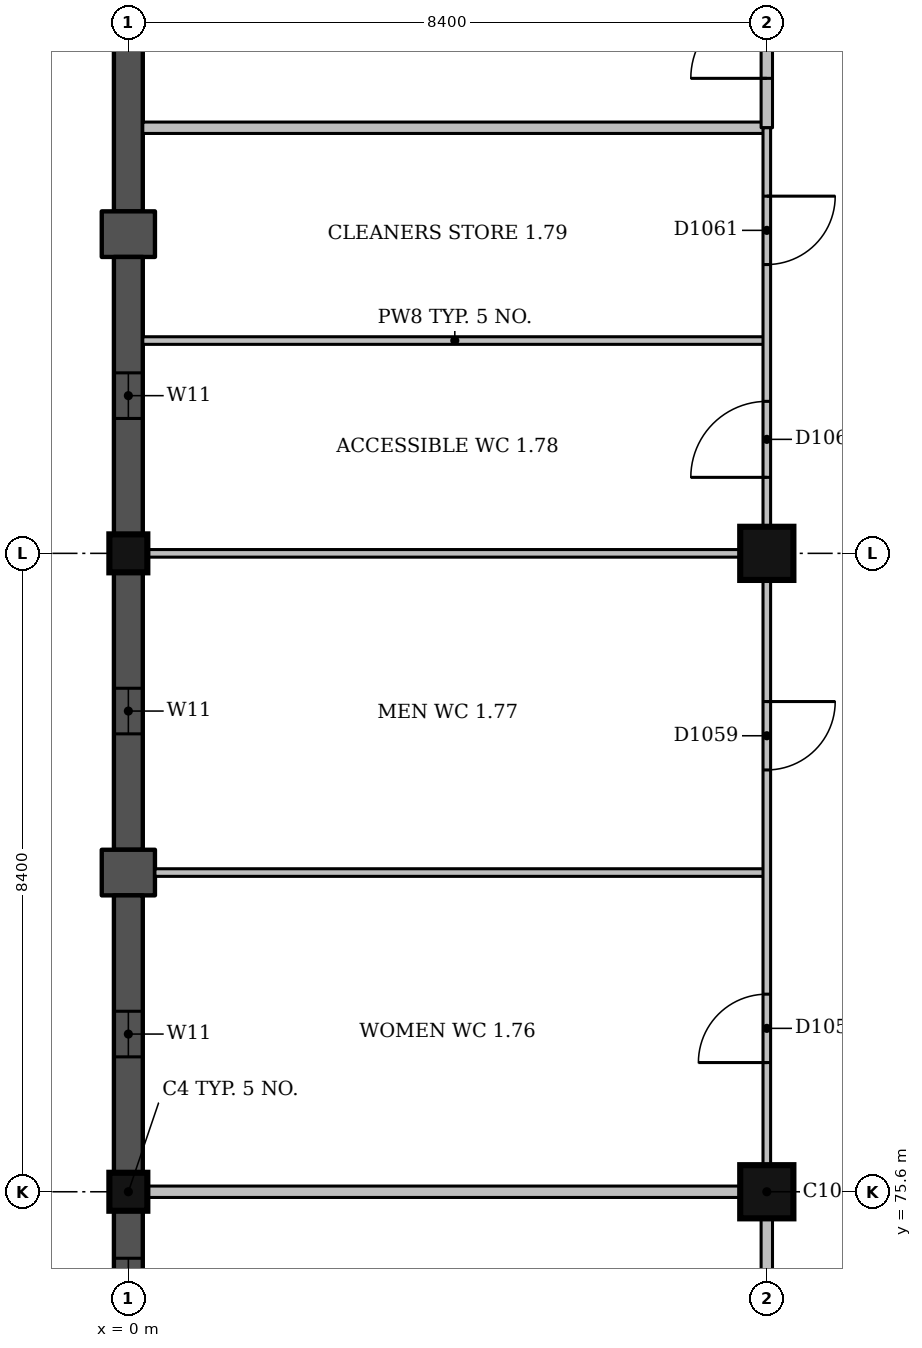
"""IFC4 building model, lengths in metres.
Left out: names, types, materials, properties, quantities, classifications, styles, units other than length and angle.
Written with IfcOpenShell. Run it as: python <this file> out.ifc"""

import sys

from ifc_helpers import new_model, si_unit, direction, frame, frame_2d, origin, origin_2d, place, context, subcontext, project, spatial, rectangle, extrude, element, fill, save


model = new_model("IFC4")
c1 = context("Model", 3, precision=1e-05, world=origin(), true_north=direction((0.0, 1.0)))
c2 = subcontext(c1, "Body", "Model", "MODEL_VIEW")
j1 = project(units=[si_unit("LENGTHUNIT", "METRE"), si_unit("PLANEANGLEUNIT", "RADIAN")], contexts=[c1])
p1 = place(None, origin())
s1 = spatial("IfcSite", under=j1, at=p1, CompositionType="ELEMENT")
p2 = place(p1, origin())
s2 = spatial("IfcBuilding", under=s1, at=p2, CompositionType="ELEMENT")
p3 = place(p2, frame((0.0, 0.0, 4.5)))
s3 = spatial("IfcBuildingStorey", under=s2, at=p3, CompositionType="ELEMENT", Elevation=4.5)
for number, where, z_axis, x_axis in (
    (1, (0.0, 75.6, -1.5), (0.0, 0.0, 1.0), (1.0, 0.0, 0.0)),
    (2, (0.0, 84.0, -1.5), (0.0, 0.0, 1.0), (1.0, 0.0, 0.0)),
):
    element("IfcColumn", number, at=place(p3, frame(where, z_axis=z_axis, x_axis=x_axis)), inside=s3, PredefinedType="COLUMN", context=c2, shape_type="SweptSolid", body=[
        extrude(rectangle(XDim=0.5, YDim=0.5, at=origin_2d()), origin(), (0.0, 0.0, 1.0), 6.0),
    ])
for number, where, z_axis, x_axis in (
    (3, (8.4, 75.6, -1.5), (0.0, 0.0, 1.0), (1.0, 0.0, 0.0)),
    (4, (8.4, 84.0, -1.5), (0.0, 0.0, 1.0), (1.0, 0.0, 0.0)),
):
    element("IfcColumn", number, at=place(p3, frame(where, z_axis=z_axis, x_axis=x_axis)), inside=s3, PredefinedType="COLUMN", context=c2, shape_type="SweptSolid", body=[
        extrude(rectangle(XDim=0.7, YDim=0.7, at=origin_2d()), origin(), (0.0, 0.0, 1.0), 6.0),
    ])
p4 = place(p3, frame((0.0, 92.15, 0.0), z_axis=(0.0, 0.0, 1.0), x_axis=(0.0, -1.0, 0.0)))
e5 = element("IfcWall", 5, at=p4, inside=s3, PredefinedType="SOLIDWALL", context=c2, shape_type="SweptSolid", body=[
    extrude(rectangle(XDim=3.65, YDim=0.38, at=frame_2d((1.825, 0.0))), origin(), (0.0, 0.0, 1.0), 3.35),
])
p5 = place(p3, frame((0.0, 88.5, 0.0), z_axis=(0.0, 0.0, 1.0), x_axis=(0.0, -1.0, 0.0)))
e6 = element("IfcWall", 6, at=p5, inside=s3, PredefinedType="SOLIDWALL", context=c2, shape_type="SweptSolid", body=[
    extrude(rectangle(XDim=0.6, YDim=0.7, at=frame_2d((0.3, 0.0))), origin(), (0.0, 0.0, 1.0), 3.35),
])
p6 = place(p3, frame((0.0, 87.9, 0.0), z_axis=(0.0, 0.0, 1.0), x_axis=(0.0, -1.0, 0.0)))
e7 = element("IfcWall", 7, at=p6, inside=s3, PredefinedType="SOLIDWALL", context=c2, shape_type="SweptSolid", body=[
    extrude(rectangle(XDim=3.65, YDim=0.38, at=frame_2d((1.825, 0.0))), origin(), (0.0, 0.0, 1.0), 3.35),
])
p7 = place(p6, frame((1.525, 0.0, 1.5)))
e8 = element("IfcOpeningElement", 8, at=p7, cuts=e7, PredefinedType="OPENING", context=c2, shape_type="SweptSolid", body=[
    extrude(rectangle(XDim=0.6, YDim=1.2, at=frame_2d((0.3, 0.6))), frame((0.0, 0.2, 0.0), z_axis=(0.0, -1.0, 0.0), x_axis=(1.0, 0.0, 0.0)), (0.0, 0.0, 1.0), 0.4),
])
p8 = place(p3, frame((0.0, 83.75, 0.0), z_axis=(0.0, 0.0, 1.0), x_axis=(0.0, -1.0, 0.0)))
e9 = element("IfcWall", 9, at=p8, inside=s3, PredefinedType="SOLIDWALL", context=c2, shape_type="SweptSolid", body=[
    extrude(rectangle(XDim=3.65, YDim=0.38, at=frame_2d((1.825, 0.0))), origin(), (0.0, 0.0, 1.0), 3.35),
])
p9 = place(p8, frame((1.525, 0.0, 1.5)))
e10 = element("IfcOpeningElement", 10, at=p9, cuts=e9, PredefinedType="OPENING", context=c2, shape_type="SweptSolid", body=[
    extrude(rectangle(XDim=0.6, YDim=1.2, at=frame_2d((0.3, 0.6))), frame((0.0, 0.2, 0.0), z_axis=(0.0, -1.0, 0.0), x_axis=(1.0, 0.0, 0.0)), (0.0, 0.0, 1.0), 0.4),
])
p10 = place(p3, frame((0.0, 80.1, 0.0), z_axis=(0.0, 0.0, 1.0), x_axis=(0.0, -1.0, 0.0)))
e11 = element("IfcWall", 11, at=p10, inside=s3, PredefinedType="SOLIDWALL", context=c2, shape_type="SweptSolid", body=[
    extrude(rectangle(XDim=0.6, YDim=0.7, at=frame_2d((0.3, 0.0))), origin(), (0.0, 0.0, 1.0), 3.35),
])
p11 = place(p3, frame((0.0, 79.5, 0.0), z_axis=(0.0, 0.0, 1.0), x_axis=(0.0, -1.0, 0.0)))
e12 = element("IfcWall", 12, at=p11, inside=s3, PredefinedType="SOLIDWALL", context=c2, shape_type="SweptSolid", body=[
    extrude(rectangle(XDim=3.65, YDim=0.38, at=frame_2d((1.825, 0.0))), origin(), (0.0, 0.0, 1.0), 3.35),
])
p12 = place(p11, frame((1.525, 0.0, 1.5)))
e13 = element("IfcOpeningElement", 13, at=p12, cuts=e12, PredefinedType="OPENING", context=c2, shape_type="SweptSolid", body=[
    extrude(rectangle(XDim=0.6, YDim=1.2, at=frame_2d((0.3, 0.6))), frame((0.0, 0.2, 0.0), z_axis=(0.0, -1.0, 0.0), x_axis=(1.0, 0.0, 0.0)), (0.0, 0.0, 1.0), 0.4),
])
p13 = place(p3, frame((0.0, 75.35, 0.0), z_axis=(0.0, 0.0, 1.0), x_axis=(0.0, -1.0, 0.0)))
e14 = element("IfcWall", 14, at=p13, inside=s3, PredefinedType="SOLIDWALL", context=c2, shape_type="SweptSolid", body=[
    extrude(rectangle(XDim=3.65, YDim=0.38, at=frame_2d((1.825, 0.0))), origin(), (0.0, 0.0, 1.0), 3.35),
])
p14 = place(p13, frame((0.625, 0.0, 1.2)))
e15 = element("IfcOpeningElement", 15, at=p14, cuts=e14, PredefinedType="OPENING", context=c2, shape_type="SweptSolid", body=[
    extrude(rectangle(XDim=2.4, YDim=1.5, at=frame_2d((1.2, 0.75))), frame((0.0, 0.2, 0.0), z_axis=(0.0, -1.0, 0.0), x_axis=(1.0, 0.0, 0.0)), (0.0, 0.0, 1.0), 0.4),
])
p15 = place(p3, frame((0.25, 75.6, 0.0), z_axis=(0.0, 0.0, 1.0), x_axis=(1.0, 0.0, 0.0)))
e16 = element("IfcWall", 16, at=p15, inside=s3, PredefinedType="PARTITIONING", context=c2, shape_type="SweptSolid", body=[
    extrude(rectangle(XDim=7.8, YDim=0.15, at=frame_2d((3.9, 0.0))), origin(), (0.0, 0.0, 1.0), 3.4),
])
p16 = place(p3, frame((0.35, 79.8, 0.0), z_axis=(0.0, 0.0, 1.0), x_axis=(1.0, 0.0, 0.0)))
e17 = element("IfcWall", 17, at=p16, inside=s3, PredefinedType="PARTITIONING", context=c2, shape_type="SweptSolid", body=[
    extrude(rectangle(XDim=8.05, YDim=0.1, at=frame_2d((4.025, 0.0))), origin(), (0.0, 0.0, 1.0), 3.4),
])
p17 = place(p3, frame((0.25, 84.0, 0.0), z_axis=(0.0, 0.0, 1.0), x_axis=(1.0, 0.0, 0.0)))
e18 = element("IfcWall", 18, at=p17, inside=s3, PredefinedType="PARTITIONING", context=c2, shape_type="SweptSolid", body=[
    extrude(rectangle(XDim=7.8, YDim=0.1, at=frame_2d((3.9, 0.0))), origin(), (0.0, 0.0, 1.0), 3.4),
])
p18 = place(p3, frame((0.19, 86.8, 0.0), z_axis=(0.0, 0.0, 1.0), x_axis=(1.0, 0.0, 0.0)))
e19 = element("IfcWall", 19, at=p18, inside=s3, PredefinedType="PARTITIONING", context=c2, shape_type="SweptSolid", body=[
    extrude(rectangle(XDim=8.21, YDim=0.1, at=frame_2d((4.105, 0.0))), origin(), (0.0, 0.0, 1.0), 3.35),
])
p19 = place(p3, frame((0.19, 89.6, 0.0), z_axis=(0.0, 0.0, 1.0), x_axis=(1.0, 0.0, 0.0)))
e20 = element("IfcWall", 20, at=p19, inside=s3, PredefinedType="PARTITIONING", context=c2, shape_type="SweptSolid", body=[
    extrude(rectangle(XDim=8.21, YDim=0.15, at=frame_2d((4.105, 0.0))), origin(), (0.0, 0.0, 1.0), 3.35),
])
p20 = place(p3, frame((8.4, 67.55, 0.0), z_axis=(0.0, 0.0, 1.0), x_axis=(0.0, 1.0, 0.0)))
e21 = element("IfcWall", 21, at=p20, inside=s3, PredefinedType="PARTITIONING", context=c2, shape_type="SweptSolid", body=[
    extrude(rectangle(XDim=7.7, YDim=0.15, at=frame_2d((3.85, 0.0))), origin(), (0.0, 0.0, 1.0), 3.4),
])
p21 = place(p3, frame((8.4, 89.6, 0.0), z_axis=(0.0, 0.0, 1.0), x_axis=(0.0, 1.0, 0.0)))
e22 = element("IfcWall", 22, at=p21, inside=s3, PredefinedType="PARTITIONING", context=c2, shape_type="SweptSolid", body=[
    extrude(rectangle(XDim=2.45, YDim=0.15, at=frame_2d((1.225, 0.0))), origin(), (0.0, 0.0, 1.0), 3.4),
])
p22 = place(p21, frame((0.65, 0.0, 0.0)))
e23 = element("IfcOpeningElement", 23, at=p22, cuts=e22, PredefinedType="OPENING", context=c2, shape_type="SweptSolid", body=[
    extrude(rectangle(XDim=1.0, YDim=2.1, at=frame_2d((0.5, 1.05))), frame((0.0, 0.085, 0.0), z_axis=(0.0, -1.0, 0.0), x_axis=(1.0, 0.0, 0.0)), (0.0, 0.0, 1.0), 0.17),
])
p23 = place(p3, frame((8.4, 75.95, 0.0), z_axis=(0.0, 0.0, 1.0), x_axis=(0.0, 1.0, 0.0)))
e24 = element("IfcWall", 24, at=p23, inside=s3, PredefinedType="PARTITIONING", context=c2, shape_type="SweptSolid", body=[
    extrude(rectangle(XDim=7.7, YDim=0.1, at=frame_2d((3.85, 0.0))), origin(), (0.0, 0.0, 1.0), 3.4),
])
p24 = place(p23, frame((1.35, 0.0, 0.0)))
e25 = element("IfcOpeningElement", 25, at=p24, cuts=e24, PredefinedType="OPENING", context=c2, shape_type="SweptSolid", body=[
    extrude(rectangle(XDim=0.9, YDim=2.1, at=frame_2d((0.45, 1.05))), frame((0.0, 0.06, 0.0), z_axis=(0.0, -1.0, 0.0), x_axis=(1.0, 0.0, 0.0)), (0.0, 0.0, 1.0), 0.12),
])
p25 = place(p23, frame((5.2, 0.0, 0.0)))
e26 = element("IfcOpeningElement", 26, at=p25, cuts=e24, PredefinedType="OPENING", context=c2, shape_type="SweptSolid", body=[
    extrude(rectangle(XDim=0.9, YDim=2.1, at=frame_2d((0.45, 1.05))), frame((0.0, 0.06, 0.0), z_axis=(0.0, -1.0, 0.0), x_axis=(1.0, 0.0, 0.0)), (0.0, 0.0, 1.0), 0.12),
])
p26 = place(p3, frame((8.4, 84.35, 0.0), z_axis=(0.0, 0.0, 1.0), x_axis=(0.0, 1.0, 0.0)))
e27 = element("IfcWall", 27, at=p26, inside=s3, PredefinedType="PARTITIONING", context=c2, shape_type="SweptSolid", body=[
    extrude(rectangle(XDim=5.25, YDim=0.1, at=frame_2d((2.625, 0.0))), origin(), (0.0, 0.0, 1.0), 3.4),
])
p27 = place(p26, frame((0.65, 0.0, 0.0)))
e28 = element("IfcOpeningElement", 28, at=p27, cuts=e27, PredefinedType="OPENING", context=c2, shape_type="SweptSolid", body=[
    extrude(rectangle(XDim=1.0, YDim=2.1, at=frame_2d((0.5, 1.05))), frame((0.0, 0.06, 0.0), z_axis=(0.0, -1.0, 0.0), x_axis=(1.0, 0.0, 0.0)), (0.0, 0.0, 1.0), 0.12),
])
p28 = place(p26, frame((3.45, 0.0, 0.0)))
e29 = element("IfcOpeningElement", 29, at=p28, cuts=e27, PredefinedType="OPENING", context=c2, shape_type="SweptSolid", body=[
    extrude(rectangle(XDim=0.9, YDim=2.1, at=frame_2d((0.45, 1.05))), frame((0.0, 0.06, 0.0), z_axis=(0.0, -1.0, 0.0), x_axis=(1.0, 0.0, 0.0)), (0.0, 0.0, 1.0), 0.12),
])
p29 = place(p7, origin())
e30 = element("IfcWindow", 30, at=p29, inside=s3, PartitioningType="SINGLE_PANEL", PredefinedType="WINDOW", context=c2, shape_type="SweptSolid", body=[
    extrude(rectangle(XDim=0.6, YDim=1.2, at=frame_2d((0.3, 0.6))), frame((0.0, 0.15, 0.0), z_axis=(0.0, -1.0, 0.0), x_axis=(1.0, 0.0, 0.0)), (0.0, 0.0, 1.0), 0.06),
])
fill(e8, e30)
p30 = place(p9, origin())
e31 = element("IfcWindow", 31, at=p30, inside=s3, PartitioningType="SINGLE_PANEL", PredefinedType="WINDOW", context=c2, shape_type="SweptSolid", body=[
    extrude(rectangle(XDim=0.6, YDim=1.2, at=frame_2d((0.3, 0.6))), frame((0.0, 0.15, 0.0), z_axis=(0.0, -1.0, 0.0), x_axis=(1.0, 0.0, 0.0)), (0.0, 0.0, 1.0), 0.06),
])
fill(e10, e31)
p31 = place(p12, origin())
e32 = element("IfcWindow", 32, at=p31, inside=s3, PartitioningType="SINGLE_PANEL", PredefinedType="WINDOW", context=c2, shape_type="SweptSolid", body=[
    extrude(rectangle(XDim=0.6, YDim=1.2, at=frame_2d((0.3, 0.6))), frame((0.0, 0.15, 0.0), z_axis=(0.0, -1.0, 0.0), x_axis=(1.0, 0.0, 0.0)), (0.0, 0.0, 1.0), 0.06),
])
fill(e13, e32)
p32 = place(p14, origin())
e33 = element("IfcWindow", 33, at=p32, inside=s3, PartitioningType="SINGLE_PANEL", PredefinedType="WINDOW", context=c2, shape_type="SweptSolid", body=[
    extrude(rectangle(XDim=2.4, YDim=1.5, at=frame_2d((1.2, 0.75))), frame((0.0, 0.15, 0.0), z_axis=(0.0, -1.0, 0.0), x_axis=(1.0, 0.0, 0.0)), (0.0, 0.0, 1.0), 0.06),
])
fill(e15, e33)
p33 = place(p24, origin())
e34 = element("IfcDoor", 34, at=p33, inside=s3, OperationType="SINGLE_SWING_LEFT", PredefinedType="DOOR", context=c2, shape_type="SweptSolid", body=[
    extrude(rectangle(XDim=0.9, YDim=2.1, at=frame_2d((0.45, 1.05))), frame((0.0, 0.025, 0.0), z_axis=(0.0, -1.0, 0.0), x_axis=(1.0, 0.0, 0.0)), (0.0, 0.0, 1.0), 0.05),
])
fill(e25, e34)
p34 = place(p25, origin())
e35 = element("IfcDoor", 35, at=p34, inside=s3, OperationType="SINGLE_SWING_RIGHT", PredefinedType="DOOR", context=c2, shape_type="SweptSolid", body=[
    extrude(rectangle(XDim=0.9, YDim=2.1, at=frame_2d((0.45, 1.05))), frame((0.0, 0.025, 0.0), z_axis=(0.0, -1.0, 0.0), x_axis=(1.0, 0.0, 0.0)), (0.0, 0.0, 1.0), 0.05),
])
fill(e26, e35)
p35 = place(p27, origin())
e36 = element("IfcDoor", 36, at=p35, inside=s3, OperationType="SINGLE_SWING_LEFT", PredefinedType="DOOR", context=c2, shape_type="SweptSolid", body=[
    extrude(rectangle(XDim=1.0, YDim=2.1, at=frame_2d((0.5, 1.05))), frame((0.0, 0.025, 0.0), z_axis=(0.0, -1.0, 0.0), x_axis=(1.0, 0.0, 0.0)), (0.0, 0.0, 1.0), 0.05),
])
fill(e28, e36)
p36 = place(p28, origin())
e37 = element("IfcDoor", 37, at=p36, inside=s3, OperationType="SINGLE_SWING_RIGHT", PredefinedType="DOOR", context=c2, shape_type="SweptSolid", body=[
    extrude(rectangle(XDim=0.9, YDim=2.1, at=frame_2d((0.45, 1.05))), frame((0.0, 0.025, 0.0), z_axis=(0.0, -1.0, 0.0), x_axis=(1.0, 0.0, 0.0)), (0.0, 0.0, 1.0), 0.05),
])
fill(e29, e37)
p37 = place(p22, origin())
e38 = element("IfcDoor", 38, at=p37, inside=s3, OperationType="SINGLE_SWING_LEFT", PredefinedType="DOOR", context=c2, shape_type="SweptSolid", body=[
    extrude(rectangle(XDim=1.0, YDim=2.1, at=frame_2d((0.5, 1.05))), frame((0.0, 0.025, 0.0), z_axis=(0.0, -1.0, 0.0), x_axis=(1.0, 0.0, 0.0)), (0.0, 0.0, 1.0), 0.05),
])
fill(e23, e38)
save(model, sys.argv[1])
